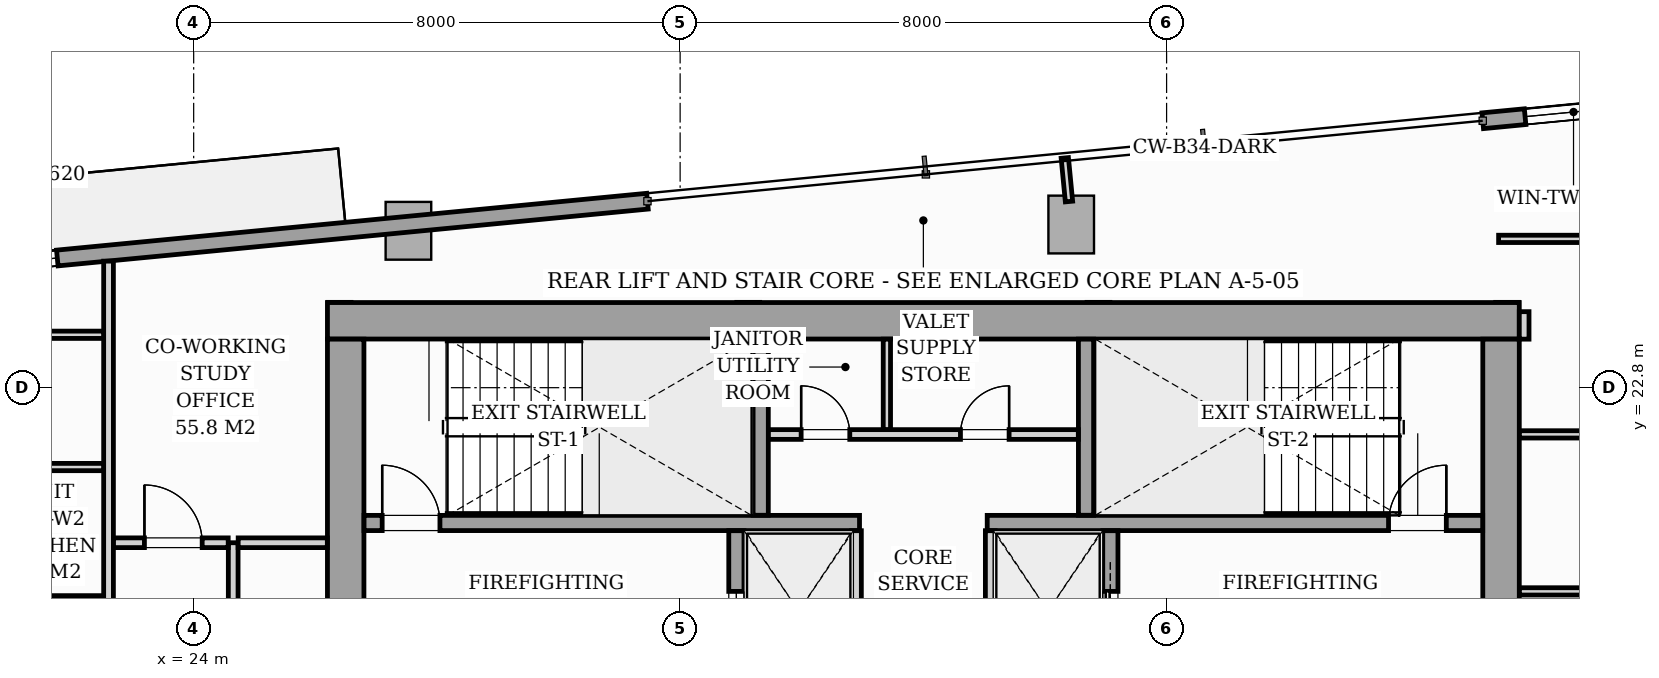
"""IFC4 building model, lengths in metres.
Left out: names, types, materials, properties, quantities, classifications, styles, units other than length and angle.
Written with IfcOpenShell. Run it as: python <this file> out.ifc"""

import sys

from ifc_helpers import new_model, si_unit, direction, frame, frame_2d, origin, origin_2d, place, context, subcontext, project, spatial, rectangle, i_section, extrude, source, transform, mapped, element, fill, save


model = new_model("IFC4")
c1 = context("Model", 3, precision=1e-05, world=origin(), true_north=direction((0.0, 1.0)))
c2 = subcontext(c1, "Body", "Model", "MODEL_VIEW")
j1 = project(units=[si_unit("LENGTHUNIT", "METRE"), si_unit("PLANEANGLEUNIT", "RADIAN")], contexts=[c1])
p1 = place(None, origin())
s1 = spatial("IfcSite", under=j1, at=p1, CompositionType="ELEMENT")
p2 = place(p1, origin())
s2 = spatial("IfcBuilding", under=s1, at=p2, CompositionType="ELEMENT")
p3 = place(p2, frame((0.0, 0.0, 182.6)))
s3 = spatial("IfcBuildingStorey", under=s2, at=p3, CompositionType="ELEMENT", Elevation=182.6)
m1 = source(origin(), c2, "Body", "SweptSolid", [
    extrude(i_section(OverallWidth=0.416, OverallDepth=0.446, WebThickness=0.039, FlangeThickness=0.063, FilletRadius=0.018, at=origin_2d()), origin(), (0.0, 0.0, 1.0), 3.196),
])
for number, where, z_axis, x_axis in (
    (1, (26.4, 24.0, 0.002), (0.0, 0.0, 1.0), (1.0, 0.0, 0.0)),
    (2, (33.12, 24.0, 0.002), (0.0, 0.0, 1.0), (1.0, 0.0, 0.0)),
    (3, (38.88, 24.0, 0.002), (0.0, 0.0, 1.0), (1.0, 0.0, 0.0)),
    (4, (45.6, 24.0, 0.002), (0.0, 0.0, 1.0), (1.0, 0.0, 0.0)),
):
    element("IfcColumn", number, at=place(p3, frame(where, z_axis=z_axis, x_axis=x_axis)), inside=s3, PredefinedType="PILASTER", context=c2, shape_type="MappedRepresentation", body=[
        mapped(m1, transform((0.0, 0.0, 0.0), scale=1.0)),
    ])
m2 = source(origin(), c2, "Body", "SweptSolid", [
    extrude(rectangle(XDim=0.75, YDim=0.95, at=origin_2d()), origin(), (0.0, 0.0, 1.0), 3.196),
])
for number, where, z_axis, x_axis in (
    (5, (27.532, 25.38, 0.002), (0.0, 0.0, 1.0), (0.995, 0.096, 0.0)),
    (6, (38.431, 25.483, 0.002), (0.0, 0.0, 1.0), (0.995, 0.096, 0.0)),
):
    element("IfcColumn", number, at=place(p3, frame(where, z_axis=z_axis, x_axis=x_axis)), inside=s3, PredefinedType="COLUMN", context=c2, shape_type="MappedRepresentation", body=[
        mapped(m2, transform((0.0, 0.0, 0.0), scale=1.0)),
    ])
p4 = place(p3, frame((15.437, 24.324, 0.0), z_axis=(0.0, 0.0, 1.0), x_axis=(0.995395627913, 0.095851676732, 0.0)))
e7 = element("IfcWall", 7, at=p4, inside=s3, PredefinedType="STANDARD", context=c2, shape_type="SweptSolid", body=[
    extrude(rectangle(XDim=16.1, YDim=0.26, at=frame_2d((8.05, 0.0))), origin(), (0.0, 0.0, 1.0), 2.94),
])
p5 = place(p4, frame((2.543, 0.0, 0.0)))
e8 = element("IfcOpeningElement", 8, at=p5, cuts=e7, PredefinedType="OPENING", context=c2, shape_type="SweptSolid", body=[
    extrude(rectangle(XDim=1.8, YDim=2.06, at=frame_2d((0.9, 1.03))), frame((0.0, 0.14, 0.0), z_axis=(0.0, -1.0, 0.0), x_axis=(1.0, 0.0, 0.0)), (0.0, 0.0, 1.0), 0.28),
])
p6 = place(p4, frame((4.75, 0.0, 0.65)))
e9 = element("IfcOpeningElement", 9, at=p6, cuts=e7, PredefinedType="OPENING", context=c2, shape_type="SweptSolid", body=[
    extrude(rectangle(XDim=1.6, YDim=1.5, at=frame_2d((0.8, 0.75))), frame((0.0, 0.14, 0.0), z_axis=(0.0, -1.0, 0.0), x_axis=(1.0, 0.0, 0.0)), (0.0, 0.0, 1.0), 0.28),
])
p7 = place(p3, frame((45.199, 27.19, 0.0), z_axis=(0.0, 0.0, 1.0), x_axis=(0.995397074604, 0.095836652014, 0.0)))
e10 = element("IfcWall", 10, at=p7, inside=s3, PredefinedType="STANDARD", context=c2, shape_type="SweptSolid", body=[
    extrude(rectangle(XDim=16.1, YDim=0.26, at=frame_2d((8.05, 0.0))), origin(), (0.0, 0.0, 1.0), 2.94),
])
p8 = place(p7, frame((7.64, 0.0, 0.0)))
e11 = element("IfcOpeningElement", 11, at=p8, cuts=e10, PredefinedType="OPENING", context=c2, shape_type="SweptSolid", body=[
    extrude(rectangle(XDim=1.8, YDim=2.06, at=frame_2d((0.9, 1.03))), frame((0.0, 0.14, 0.0), z_axis=(0.0, -1.0, 0.0), x_axis=(1.0, 0.0, 0.0)), (0.0, 0.0, 1.0), 0.28),
])
p9 = place(p7, frame((0.7, 0.0, 0.65)))
e12 = element("IfcOpeningElement", 12, at=p9, cuts=e10, PredefinedType="OPENING", context=c2, shape_type="SweptSolid", body=[
    extrude(rectangle(XDim=1.6, YDim=1.5, at=frame_2d((0.8, 0.75))), frame((0.0, 0.14, 0.0), z_axis=(0.0, -1.0, 0.0), x_axis=(1.0, 0.0, 0.0)), (0.0, 0.0, 1.0), 0.28),
])
p10 = place(p3, frame((26.2, 23.9, 0.0), z_axis=(0.0, 0.0, 1.0), x_axis=(1.0, 0.0, 0.0)))
e13 = element("IfcWall", 13, at=p10, inside=s3, PredefinedType="SHEAR", context=c2, shape_type="SweptSolid", body=[
    extrude(rectangle(XDim=19.6, YDim=0.6, at=frame_2d((9.8, 0.0))), origin(), (0.0, 0.0, 1.0), 3.2),
])
for number, where, z_axis, x_axis in (
    (14, (26.5, 17.802, 0.0), (0.0, 0.0, 1.0), (0.0, 1.0, 0.0)),
    (15, (45.5, 17.802, 0.0), (0.0, 0.0, 1.0), (0.0, 1.0, 0.0)),
):
    element("IfcWall", number, at=place(p3, frame(where, z_axis=z_axis, x_axis=x_axis)), inside=s3, PredefinedType="SHEAR", context=c2, shape_type="SweptSolid", body=[
        extrude(rectangle(XDim=5.796, YDim=0.6, at=frame_2d((2.898, 0.0))), origin(), (0.0, 0.0, 1.0), 3.2),
    ])
p11 = place(p3, frame((26.802, 20.575, 0.0), z_axis=(0.0, 0.0, 1.0), x_axis=(1.0, 0.0, 0.0)))
e16 = element("IfcWall", 16, at=p11, inside=s3, PredefinedType="SOLIDWALL", context=c2, shape_type="SweptSolid", body=[
    extrude(rectangle(XDim=8.148, YDim=0.25, at=frame_2d((4.074, 0.0))), origin(), (0.0, 0.0, 1.0), 3.2),
])
p12 = place(p11, frame((0.298, 0.0, 0.0)))
e17 = element("IfcOpeningElement", 17, at=p12, cuts=e16, PredefinedType="OPENING", context=c2, shape_type="SweptSolid", body=[
    extrude(rectangle(XDim=0.95, YDim=2.06, at=frame_2d((0.475, 1.03))), frame((0.0, 0.135, 0.0), z_axis=(0.0, -1.0, 0.0), x_axis=(1.0, 0.0, 0.0)), (0.0, 0.0, 1.0), 0.27),
])
p13 = place(p3, frame((37.05, 20.575, 0.0), z_axis=(0.0, 0.0, 1.0), x_axis=(1.0, 0.0, 0.0)))
e18 = element("IfcWall", 18, at=p13, inside=s3, PredefinedType="SOLIDWALL", context=c2, shape_type="SweptSolid", body=[
    extrude(rectangle(XDim=8.148, YDim=0.25, at=frame_2d((4.074, 0.0))), origin(), (0.0, 0.0, 1.0), 3.2),
])
p14 = place(p13, frame((6.6, 0.0, 0.0)))
e19 = element("IfcOpeningElement", 19, at=p14, cuts=e18, PredefinedType="OPENING", context=c2, shape_type="SweptSolid", body=[
    extrude(rectangle(XDim=0.95, YDim=2.06, at=frame_2d((0.475, 1.03))), frame((0.0, 0.135, 0.0), z_axis=(0.0, -1.0, 0.0), x_axis=(1.0, 0.0, 0.0)), (0.0, 0.0, 1.0), 0.27),
])
for number, where, z_axis, x_axis in (
    (20, (33.325, 20.702, 0.0), (0.0, 0.0, 1.0), (0.0, 1.0, 0.0)),
    (21, (38.675, 20.702, 0.0), (0.0, 0.0, 1.0), (0.0, 1.0, 0.0)),
):
    element("IfcWall", number, at=place(p3, frame(where, z_axis=z_axis, x_axis=x_axis)), inside=s3, PredefinedType="SOLIDWALL", context=c2, shape_type="SweptSolid", body=[
        extrude(rectangle(XDim=2.896, YDim=0.25, at=frame_2d((1.448, 0.0))), origin(), (0.0, 0.0, 1.0), 3.2),
    ])
p15 = place(p3, frame((32.925, 17.802, 0.0), z_axis=(0.0, 0.0, 1.0), x_axis=(0.0, 1.0, 0.0)))
e22 = element("IfcWall", 22, at=p15, inside=s3, PredefinedType="SOLIDWALL", context=c2, shape_type="SweptSolid", body=[
    extrude(rectangle(XDim=2.646, YDim=0.25, at=frame_2d((1.323, 0.0))), origin(), (0.0, 0.0, 1.0), 3.2),
])
p16 = place(p15, frame((0.548, 0.0, 0.0)))
e23 = element("IfcOpeningElement", 23, at=p16, cuts=e22, PredefinedType="OPENING", context=c2, shape_type="SweptSolid", body=[
    extrude(rectangle(XDim=1.1, YDim=2.08, at=frame_2d((0.55, 1.04))), frame((0.0, 0.135, 0.0), z_axis=(0.0, -1.0, 0.0), x_axis=(1.0, 0.0, 0.0)), (0.0, 0.0, 1.0), 0.27),
])
for number, where, z_axis, x_axis in (
    (24, (34.9, 17.802, 0.0), (0.0, 0.0, 1.0), (0.0, 1.0, 0.0)),
    (25, (37.1, 17.802, 0.0), (0.0, 0.0, 1.0), (0.0, 1.0, 0.0)),
):
    element("IfcWall", number, at=place(p3, frame(where, z_axis=z_axis, x_axis=x_axis)), inside=s3, PredefinedType="PARTITIONING", context=c2, shape_type="SweptSolid", body=[
        extrude(rectangle(XDim=2.646, YDim=0.16, at=frame_2d((1.323, 0.0))), origin(), (0.0, 0.0, 1.0), 2.94),
    ])
p17 = place(p3, frame((39.075, 17.802, 0.0), z_axis=(0.0, 0.0, 1.0), x_axis=(0.0, 1.0, 0.0)))
e26 = element("IfcWall", 26, at=p17, inside=s3, PredefinedType="SOLIDWALL", context=c2, shape_type="SweptSolid", body=[
    extrude(rectangle(XDim=2.646, YDim=0.25, at=frame_2d((1.323, 0.0))), origin(), (0.0, 0.0, 1.0), 3.2),
])
p18 = place(p17, frame((0.548, 0.0, 0.0)))
e27 = element("IfcOpeningElement", 27, at=p18, cuts=e26, PredefinedType="OPENING", context=c2, shape_type="SweptSolid", body=[
    extrude(rectangle(XDim=1.1, YDim=2.08, at=frame_2d((0.55, 1.04))), frame((0.0, 0.135, 0.0), z_axis=(0.0, -1.0, 0.0), x_axis=(1.0, 0.0, 0.0)), (0.0, 0.0, 1.0), 0.27),
])
p19 = place(p3, frame((33.452, 22.03, 0.0), z_axis=(0.0, 0.0, 1.0), x_axis=(1.0, 0.0, 0.0)))
e28 = element("IfcWall", 28, at=p19, inside=s3, PredefinedType="PARTITIONING", context=c2, shape_type="SweptSolid", body=[
    extrude(rectangle(XDim=5.096, YDim=0.16, at=frame_2d((2.548, 0.0))), origin(), (0.0, 0.0, 1.0), 2.94),
])
p20 = place(p19, frame((0.538, 0.0, 0.0)))
e29 = element("IfcOpeningElement", 29, at=p20, cuts=e28, PredefinedType="OPENING", context=c2, shape_type="SweptSolid", body=[
    extrude(rectangle(XDim=0.8, YDim=2.05, at=frame_2d((0.4, 1.025))), frame((0.0, 0.09, 0.0), z_axis=(0.0, -1.0, 0.0), x_axis=(1.0, 0.0, 0.0)), (0.0, 0.0, 1.0), 0.18),
])
p21 = place(p19, frame((3.158, 0.0, 0.0)))
e30 = element("IfcOpeningElement", 30, at=p21, cuts=e28, PredefinedType="OPENING", context=c2, shape_type="SweptSolid", body=[
    extrude(rectangle(XDim=0.8, YDim=2.05, at=frame_2d((0.4, 1.025))), frame((0.0, 0.09, 0.0), z_axis=(0.0, -1.0, 0.0), x_axis=(1.0, 0.0, 0.0)), (0.0, 0.0, 1.0), 0.18),
])
p22 = place(p3, frame((35.4, 22.112, 0.0), z_axis=(0.0, 0.0, 1.0), x_axis=(0.0, 1.0, 0.0)))
e31 = element("IfcWall", 31, at=p22, inside=s3, PredefinedType="PARTITIONING", context=c2, shape_type="SweptSolid", body=[
    extrude(rectangle(XDim=1.486, YDim=0.12, at=frame_2d((0.743, 0.0))), origin(), (0.0, 0.0, 1.0), 2.94),
])
p23 = place(p3, frame((22.6, 13.332, 0.0), z_axis=(0.0, 0.0, 1.0), x_axis=(0.0, 1.0, 0.0)))
e32 = element("IfcWall", 32, at=p23, inside=s3, PredefinedType="PARTITIONING", context=c2, shape_type="SweptSolid", body=[
    extrude(rectangle(XDim=11.549, YDim=0.16, at=frame_2d((5.774, 0.0))), origin(), (0.0, 0.0, 1.0), 2.94),
])
p24 = place(p23, frame((0.493, 0.0, 0.0)))
e33 = element("IfcOpeningElement", 33, at=p24, cuts=e32, PredefinedType="OPENING", context=c2, shape_type="SweptSolid", body=[
    extrude(rectangle(XDim=0.95, YDim=2.06, at=frame_2d((0.475, 1.03))), frame((0.0, 0.09, 0.0), z_axis=(0.0, -1.0, 0.0), x_axis=(1.0, 0.0, 0.0)), (0.0, 0.0, 1.0), 0.18),
])
p25 = place(p23, frame((4.713, 0.0, 0.0)))
e34 = element("IfcOpeningElement", 34, at=p25, cuts=e32, PredefinedType="OPENING", context=c2, shape_type="SweptSolid", body=[
    extrude(rectangle(XDim=0.95, YDim=2.06, at=frame_2d((0.475, 1.03))), frame((0.0, 0.09, 0.0), z_axis=(0.0, -1.0, 0.0), x_axis=(1.0, 0.0, 0.0)), (0.0, 0.0, 1.0), 0.18),
])
p26 = place(p3, frame((45.88, 23.598, 0.0), z_axis=(0.0, 0.0, 1.0), x_axis=(0.0, 1.0, 0.0)))
e35 = element("IfcWall", 35, at=p26, inside=s3, PredefinedType="PARTITIONING", context=c2, shape_type="SweptSolid", body=[
    extrude(rectangle(XDim=0.452, YDim=0.16, at=frame_2d((0.226, 0.0))), origin(), (0.0, 0.0, 1.0), 2.94),
])
for number, where, z_axis, x_axis in (
    (36, (20.262, 21.495, 0.0), (0.0, 0.0, 1.0), (1.0, 0.0, 0.0)),
    (37, (20.262, 19.32, 0.0), (0.0, 0.0, 1.0), (1.0, 0.0, 0.0)),
):
    element("IfcWall", number, at=place(p3, frame(where, z_axis=z_axis, x_axis=x_axis)), inside=s3, PredefinedType="PARTITIONING", context=c2, shape_type="SweptSolid", body=[
        extrude(rectangle(XDim=2.256, YDim=0.12, at=frame_2d((1.128, 0.0))), origin(), (0.0, 0.0, 1.0), 2.94),
    ])
p27 = place(p3, frame((20.262, 23.67, 0.0), z_axis=(0.0, 0.0, 1.0), x_axis=(1.0, 0.0, 0.0)))
e38 = element("IfcWall", 38, at=p27, inside=s3, PredefinedType="PARTITIONING", context=c2, shape_type="SweptSolid", body=[
    extrude(rectangle(XDim=2.256, YDim=0.12, at=frame_2d((1.128, 0.0))), origin(), (0.0, 0.0, 1.0), 2.3),
])
p28 = place(p3, frame((45.802, 19.45, 0.0), z_axis=(0.0, 0.0, 1.0), x_axis=(1.0, 0.0, 0.0)))
e39 = element("IfcWall", 39, at=p28, inside=s3, PredefinedType="PARTITIONING", context=c2, shape_type="SweptSolid", body=[
    extrude(rectangle(XDim=2.416, YDim=0.12, at=frame_2d((1.208, 0.0))), origin(), (0.0, 0.0, 1.0), 2.94),
])
p29 = place(p3, frame((45.46, 25.247, 0.0), z_axis=(0.0, 0.0, 1.0), x_axis=(1.0, 0.0, 0.0)))
e40 = element("IfcWall", 40, at=p29, inside=s3, PredefinedType="PARTITIONING", context=c2, shape_type="SweptSolid", body=[
    extrude(rectangle(XDim=9.461, YDim=0.12, at=frame_2d((4.73, 0.0))), origin(), (0.0, 0.0, 1.0), 2.94),
])
p30 = place(p29, frame((4.826, 0.0, 0.0)))
e41 = element("IfcOpeningElement", 41, at=p30, cuts=e40, PredefinedType="OPENING", context=c2, shape_type="SweptSolid", body=[
    extrude(rectangle(XDim=0.85, YDim=2.05, at=frame_2d((0.425, 1.025))), frame((0.0, 0.07, 0.0), z_axis=(0.0, -1.0, 0.0), x_axis=(1.0, 0.0, 0.0)), (0.0, 0.0, 1.0), 0.14),
])
p31 = place(p3, frame((45.802, 22.032, 0.0), z_axis=(0.0, 0.0, 1.0), x_axis=(1.0, 0.0, 0.0)))
e42 = element("IfcWall", 42, at=p31, inside=s3, PredefinedType="PARTITIONING", context=c2, shape_type="SweptSolid", body=[
    extrude(rectangle(XDim=18.499, YDim=0.12, at=frame_2d((9.25, 0.0))), origin(), (0.0, 0.0, 1.0), 2.94),
])
p32 = place(p31, frame((8.911, 0.0, 0.0)))
e43 = element("IfcOpeningElement", 43, at=p32, cuts=e42, PredefinedType="OPENING", context=c2, shape_type="SweptSolid", body=[
    extrude(rectangle(XDim=0.85, YDim=2.05, at=frame_2d((0.425, 1.025))), frame((0.0, 0.07, 0.0), z_axis=(0.0, -1.0, 0.0), x_axis=(1.0, 0.0, 0.0)), (0.0, 0.0, 1.0), 0.14),
])
p33 = place(p3, frame((24.65, 14.66, 0.0), z_axis=(0.0, 0.0, 1.0), x_axis=(0.0, 1.0, 0.0)))
e44 = element("IfcWall", 44, at=p33, inside=s3, PredefinedType="PARTITIONING", context=c2, shape_type="SweptSolid", body=[
    extrude(rectangle(XDim=5.59, YDim=0.16, at=frame_2d((2.795, 0.0))), origin(), (0.0, 0.0, 1.0), 2.94),
])
p34 = place(p33, frame((3.54, 0.0, 0.0)))
e45 = element("IfcOpeningElement", 45, at=p34, cuts=e44, PredefinedType="OPENING", context=c2, shape_type="SweptSolid", body=[
    extrude(rectangle(XDim=0.9, YDim=2.05, at=frame_2d((0.45, 1.025))), frame((0.0, 0.09, 0.0), z_axis=(0.0, -1.0, 0.0), x_axis=(1.0, 0.0, 0.0)), (0.0, 0.0, 1.0), 0.18),
])
p35 = place(p3, frame((22.682, 20.25, 0.0), z_axis=(0.0, 0.0, 1.0), x_axis=(1.0, 0.0, 0.0)))
e46 = element("IfcWall", 46, at=p35, inside=s3, PredefinedType="PARTITIONING", context=c2, shape_type="SweptSolid", body=[
    extrude(rectangle(XDim=1.886, YDim=0.16, at=frame_2d((0.943, 0.0))), origin(), (0.0, 0.0, 1.0), 2.94),
])
p36 = place(p35, frame((0.508, 0.0, 0.0)))
e47 = element("IfcOpeningElement", 47, at=p36, cuts=e46, PredefinedType="OPENING", context=c2, shape_type="SweptSolid", body=[
    extrude(rectangle(XDim=0.95, YDim=2.06, at=frame_2d((0.475, 1.03))), frame((0.0, 0.09, 0.0), z_axis=(0.0, -1.0, 0.0), x_axis=(1.0, 0.0, 0.0)), (0.0, 0.0, 1.0), 0.18),
])
p37 = place(p3, frame((24.732, 20.25, 0.0), z_axis=(0.0, 0.0, 1.0), x_axis=(1.0, 0.0, 0.0)))
e48 = element("IfcWall", 48, at=p37, inside=s3, PredefinedType="PARTITIONING", context=c2, shape_type="SweptSolid", body=[
    extrude(rectangle(XDim=1.466, YDim=0.16, at=frame_2d((0.733, 0.0))), origin(), (0.0, 0.0, 1.0), 2.94),
])
p38 = place(p3, frame((38.395, 25.861, 0.0), z_axis=(0.0, 0.0, 1.0), x_axis=(-0.095977354523, 0.995383517755, 0.0)))
e49 = element("IfcWall", 49, at=p38, inside=s3, PredefinedType="PARTITIONING", context=c2, shape_type="SweptSolid", body=[
    extrude(rectangle(XDim=0.72, YDim=0.12, at=frame_2d((0.36, 0.0))), origin(), (0.0, 0.0, 1.0), 2.94),
])
m3 = source(origin(), c2, "Body", "SweptSolid", [
    extrude(rectangle(XDim=1.6, YDim=1.5, at=frame_2d((0.8, 0.75))), frame((0.0, 0.03, 0.0), z_axis=(0.0, -1.0, 0.0), x_axis=(1.0, 0.0, 0.0)), (0.0, 0.0, 1.0), 0.06),
])
p39 = place(p6, origin())
e50 = element("IfcWindow", 50, at=p39, inside=s3, PartitioningType="SINGLE_PANEL", PredefinedType="WINDOW", context=c2, shape_type="MappedRepresentation", body=[
    mapped(m3, transform((0.0, 0.0, 0.0), scale=1.0)),
])
fill(e9, e50)
p40 = place(p9, origin())
e51 = element("IfcWindow", 51, at=p40, inside=s3, PartitioningType="SINGLE_PANEL", PredefinedType="WINDOW", context=c2, shape_type="MappedRepresentation", body=[
    mapped(m3, transform((0.0, 0.0, 0.0), scale=1.0)),
])
fill(e12, e51)
m4 = source(origin(), c2, "Body", "SweptSolid", [
    extrude(rectangle(XDim=0.95, YDim=2.06, at=frame_2d((0.475, 1.03))), frame((0.0, 0.025, 0.0), z_axis=(0.0, -1.0, 0.0), x_axis=(1.0, 0.0, 0.0)), (0.0, 0.0, 1.0), 0.05),
])
p41 = place(p12, origin())
e52 = element("IfcDoor", 52, at=p41, inside=s3, OperationType="SINGLE_SWING_LEFT", PredefinedType="DOOR", context=c2, shape_type="MappedRepresentation", body=[
    mapped(m4, transform((0.0, 0.0, 0.0), scale=1.0)),
])
fill(e17, e52)
p42 = place(p14, origin())
e53 = element("IfcDoor", 53, at=p42, inside=s3, OperationType="SINGLE_SWING_RIGHT", PredefinedType="DOOR", context=c2, shape_type="MappedRepresentation", body=[
    mapped(m4, transform((0.0, 0.0, 0.0), scale=1.0)),
])
fill(e19, e53)
m5 = source(origin(), c2, "Body", "SweptSolid", [
    extrude(rectangle(XDim=1.1, YDim=2.08, at=frame_2d((0.55, 1.04))), frame((0.0, 0.025, 0.0), z_axis=(0.0, -1.0, 0.0), x_axis=(1.0, 0.0, 0.0)), (0.0, 0.0, 1.0), 0.05),
])
p43 = place(p16, origin())
e54 = element("IfcDoor", 54, at=p43, inside=s3, OperationType="SLIDING_TO_LEFT", PredefinedType="DOOR", context=c2, shape_type="MappedRepresentation", body=[
    mapped(m5, transform((0.0, 0.0, 0.0), scale=1.0)),
])
fill(e23, e54)
p44 = place(p18, origin())
e55 = element("IfcDoor", 55, at=p44, inside=s3, OperationType="SLIDING_TO_RIGHT", PredefinedType="DOOR", context=c2, shape_type="MappedRepresentation", body=[
    mapped(m5, transform((0.0, 0.0, 0.0), scale=1.0)),
])
fill(e27, e55)
m6 = source(origin(), c2, "Body", "SweptSolid", [
    extrude(rectangle(XDim=0.8, YDim=2.05, at=frame_2d((0.4, 1.025))), frame((0.0, 0.025, 0.0), z_axis=(0.0, -1.0, 0.0), x_axis=(1.0, 0.0, 0.0)), (0.0, 0.0, 1.0), 0.05),
])
p45 = place(p20, origin())
e56 = element("IfcDoor", 56, at=p45, inside=s3, OperationType="SINGLE_SWING_LEFT", PredefinedType="DOOR", context=c2, shape_type="MappedRepresentation", body=[
    mapped(m6, transform((0.0, 0.0, 0.0), scale=1.0)),
])
fill(e29, e56)
p46 = place(p21, origin())
e57 = element("IfcDoor", 57, at=p46, inside=s3, OperationType="SINGLE_SWING_RIGHT", PredefinedType="DOOR", context=c2, shape_type="MappedRepresentation", body=[
    mapped(m6, transform((0.0, 0.0, 0.0), scale=1.0)),
])
fill(e30, e57)
m7 = source(origin(), c2, "Body", "SweptSolid", [
    extrude(rectangle(XDim=0.95, YDim=2.06, at=frame_2d((0.475, 1.03))), frame((0.0, 0.025, 0.0), z_axis=(0.0, -1.0, 0.0), x_axis=(1.0, 0.0, 0.0)), (0.0, 0.0, 1.0), 0.05),
])
p47 = place(p36, origin())
e58 = element("IfcDoor", 58, at=p47, inside=s3, OperationType="SINGLE_SWING_LEFT", PredefinedType="DOOR", context=c2, shape_type="MappedRepresentation", body=[
    mapped(m7, transform((0.0, 0.0, 0.0), scale=1.0)),
])
fill(e47, e58)
save(model, sys.argv[1])
